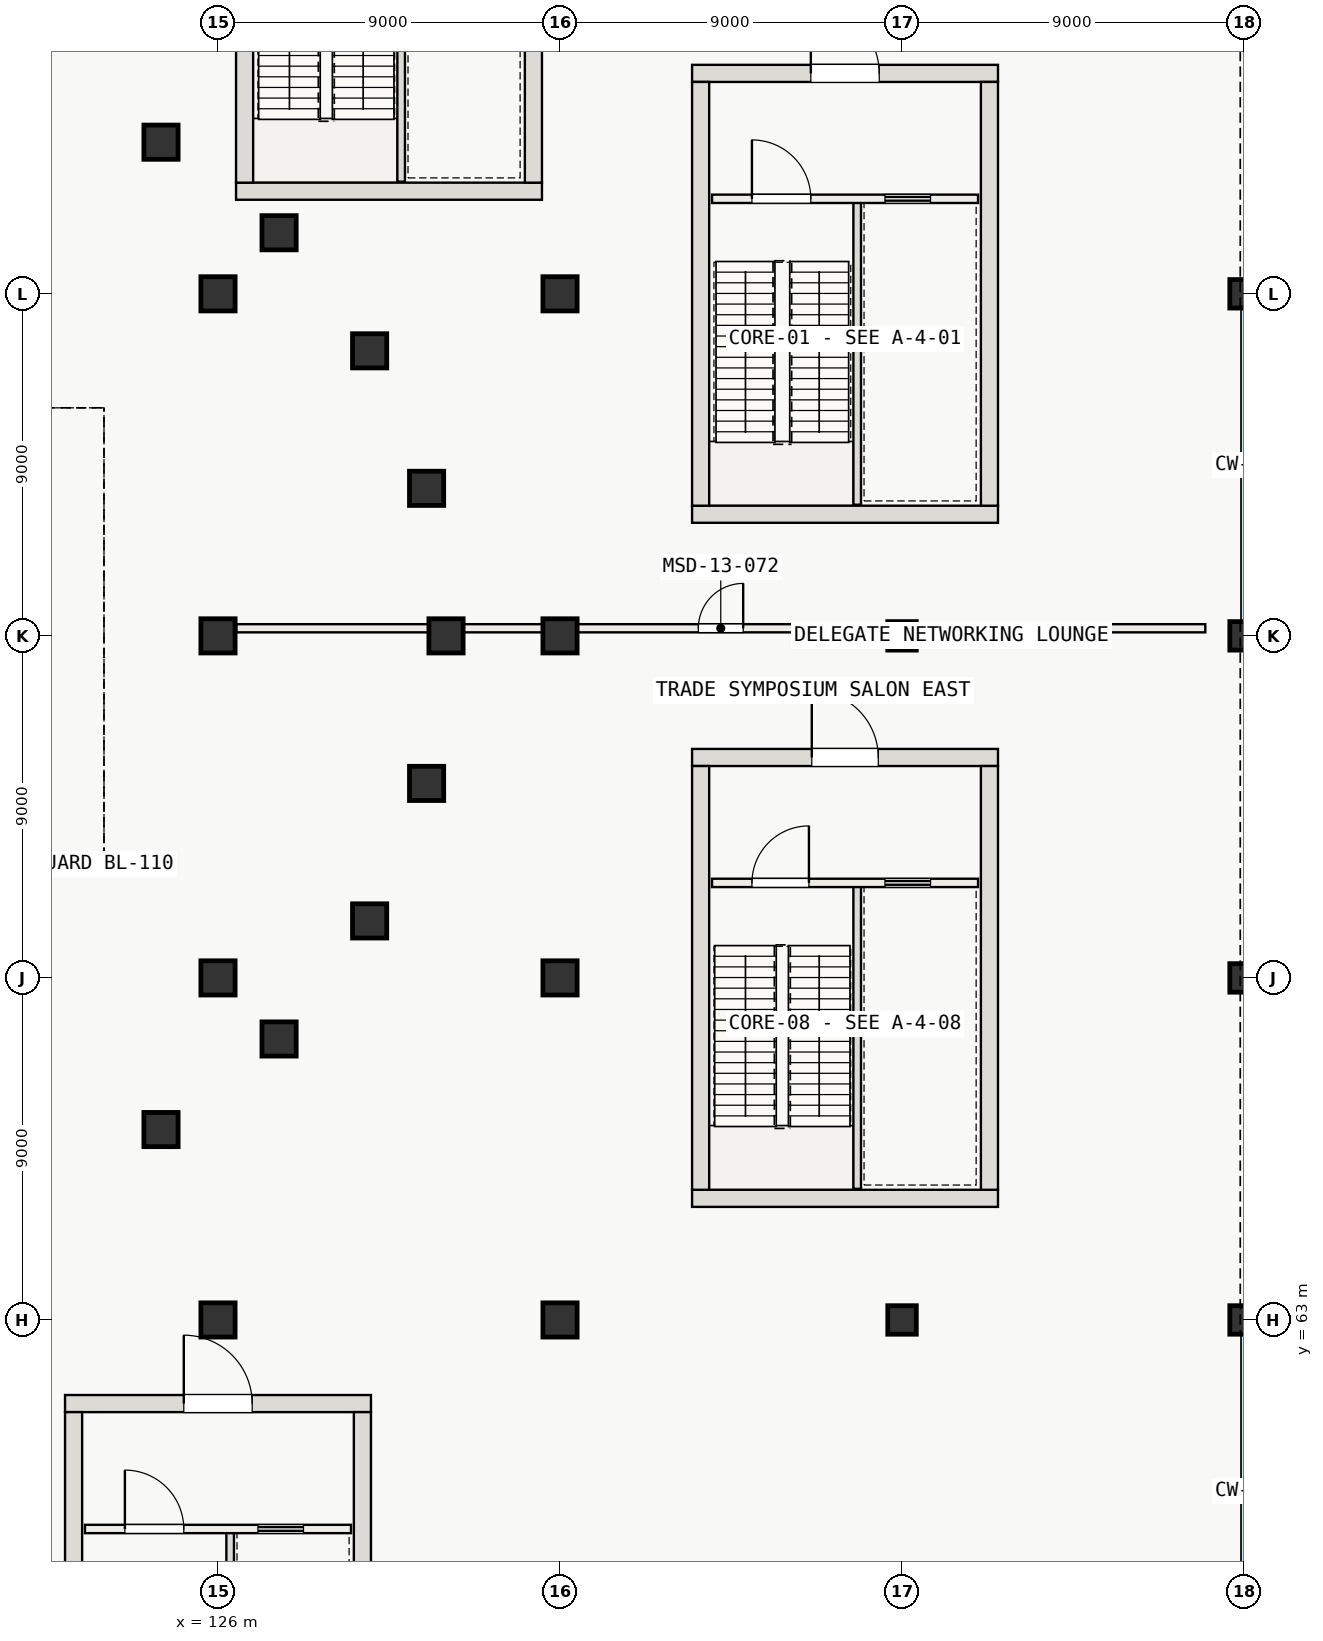
"""IFC4 building model, lengths in metres.
Left out: names, types, materials, properties, quantities, classifications, styles, units other than length and angle.
Written with IfcOpenShell. Run it as: python <this file> out.ifc"""

import sys

from ifc_helpers import new_model, si_unit, direction, frame, frame_2d, origin, origin_2d, place, context, subcontext, project, spatial, rectangle, circle, extrude, element, fill, save


model = new_model("IFC4")
c1 = context("Model", 3, precision=1e-05, world=origin(), true_north=direction((0.0, 1.0)))
c2 = subcontext(c1, "Body", "Model", "MODEL_VIEW")
j1 = project(units=[si_unit("LENGTHUNIT", "METRE"), si_unit("PLANEANGLEUNIT", "RADIAN")], contexts=[c1])
p1 = place(None, origin())
s1 = spatial("IfcSite", under=j1, at=p1, CompositionType="ELEMENT")
p2 = place(p1, origin())
s2 = spatial("IfcBuilding", under=s1, at=p2, CompositionType="ELEMENT")
p3 = place(p2, frame((0.0, 0.0, 6.0)))
s3 = spatial("IfcBuildingStorey", under=s2, at=p3, CompositionType="ELEMENT", Elevation=6.0)
p4 = place(p3, frame((138.475, 84.2, 0.0), z_axis=(0.0, 0.0, 1.0), x_axis=(1.0, 0.0, 0.0)))
e1 = element("IfcWall", 1, at=p4, inside=s3, PredefinedType="SHEAR", context=c2, shape_type="SweptSolid", body=[
    extrude(rectangle(XDim=8.05, YDim=0.45, at=frame_2d((4.025, 0.0))), origin(), (0.0, 0.0, 1.0), 6.0),
])
p5 = place(p3, frame((138.475, 95.8, 0.0), z_axis=(0.0, 0.0, 1.0), x_axis=(1.0, 0.0, 0.0)))
e2 = element("IfcWall", 2, at=p5, inside=s3, PredefinedType="SHEAR", context=c2, shape_type="SweptSolid", body=[
    extrude(rectangle(XDim=8.05, YDim=0.45, at=frame_2d((4.025, 0.0))), origin(), (0.0, 0.0, 1.0), 6.0),
])
p6 = place(p5, frame((3.125, 0.0, 0.0)))
e3 = element("IfcOpeningElement", 3, at=p6, cuts=e2, PredefinedType="OPENING", context=c2, shape_type="SweptSolid", body=[
    extrude(rectangle(XDim=1.8, YDim=2.3, at=frame_2d((0.9, 1.15))), frame((0.0, 0.235, 0.0), z_axis=(0.0, -1.0, 0.0), x_axis=(1.0, 0.0, 0.0)), (0.0, 0.0, 1.0), 0.47),
])
for number, where, z_axis, x_axis in (
    (4, (138.7, 84.425, 0.0), (0.0, 0.0, 1.0), (0.0, 1.0, 0.0)),
    (5, (146.3, 84.425, 0.0), (0.0, 0.0, 1.0), (0.0, 1.0, 0.0)),
):
    element("IfcWall", number, at=place(p3, frame(where, z_axis=z_axis, x_axis=x_axis)), inside=s3, PredefinedType="SHEAR", context=c2, shape_type="SweptSolid", body=[
        extrude(rectangle(XDim=11.15, YDim=0.45, at=frame_2d((5.575, 0.0))), origin(), (0.0, 0.0, 1.0), 6.0),
    ])
p7 = place(p3, frame((126.475, 92.7, 0.0), z_axis=(0.0, 0.0, 1.0), x_axis=(1.0, 0.0, 0.0)))
e6 = element("IfcWall", 6, at=p7, inside=s3, PredefinedType="SHEAR", context=c2, shape_type="SweptSolid", body=[
    extrude(rectangle(XDim=8.05, YDim=0.45, at=frame_2d((4.025, 0.0))), origin(), (0.0, 0.0, 1.0), 6.0),
])
for number, where, z_axis, x_axis in (
    (7, (126.7, 92.925, 0.0), (0.0, 0.0, 1.0), (0.0, 1.0, 0.0)),
    (8, (134.3, 92.925, 0.0), (0.0, 0.0, 1.0), (0.0, 1.0, 0.0)),
):
    element("IfcWall", number, at=place(p3, frame(where, z_axis=z_axis, x_axis=x_axis)), inside=s3, PredefinedType="SHEAR", context=c2, shape_type="SweptSolid", body=[
        extrude(rectangle(XDim=11.15, YDim=0.45, at=frame_2d((5.575, 0.0))), origin(), (0.0, 0.0, 1.0), 6.0),
    ])
p8 = place(p3, frame((121.975, 60.8, 0.0), z_axis=(0.0, 0.0, 1.0), x_axis=(1.0, 0.0, 0.0)))
e9 = element("IfcWall", 9, at=p8, inside=s3, PredefinedType="SHEAR", context=c2, shape_type="SweptSolid", body=[
    extrude(rectangle(XDim=8.05, YDim=0.45, at=frame_2d((4.025, 0.0))), origin(), (0.0, 0.0, 1.0), 6.0),
])
p9 = place(p8, frame((3.125, 0.0, 0.0)))
e10 = element("IfcOpeningElement", 10, at=p9, cuts=e9, PredefinedType="OPENING", context=c2, shape_type="SweptSolid", body=[
    extrude(rectangle(XDim=1.8, YDim=2.3, at=frame_2d((0.9, 1.15))), frame((0.0, 0.235, 0.0), z_axis=(0.0, -1.0, 0.0), x_axis=(1.0, 0.0, 0.0)), (0.0, 0.0, 1.0), 0.47),
])
for number, where, z_axis, x_axis in (
    (11, (122.2, 49.425, 0.0), (0.0, 0.0, 1.0), (0.0, 1.0, 0.0)),
    (12, (129.8, 49.425, 0.0), (0.0, 0.0, 1.0), (0.0, 1.0, 0.0)),
):
    element("IfcWall", number, at=place(p3, frame(where, z_axis=z_axis, x_axis=x_axis)), inside=s3, PredefinedType="SHEAR", context=c2, shape_type="SweptSolid", body=[
        extrude(rectangle(XDim=11.15, YDim=0.45, at=frame_2d((5.575, 0.0))), origin(), (0.0, 0.0, 1.0), 6.0),
    ])
p10 = place(p3, frame((138.475, 66.2, 0.0), z_axis=(0.0, 0.0, 1.0), x_axis=(1.0, 0.0, 0.0)))
e13 = element("IfcWall", 13, at=p10, inside=s3, PredefinedType="SHEAR", context=c2, shape_type="SweptSolid", body=[
    extrude(rectangle(XDim=8.05, YDim=0.45, at=frame_2d((4.025, 0.0))), origin(), (0.0, 0.0, 1.0), 6.0),
])
p11 = place(p3, frame((138.475, 77.8, 0.0), z_axis=(0.0, 0.0, 1.0), x_axis=(1.0, 0.0, 0.0)))
e14 = element("IfcWall", 14, at=p11, inside=s3, PredefinedType="SHEAR", context=c2, shape_type="SweptSolid", body=[
    extrude(rectangle(XDim=8.05, YDim=0.45, at=frame_2d((4.025, 0.0))), origin(), (0.0, 0.0, 1.0), 6.0),
])
p12 = place(p11, frame((3.15, 0.0, 0.0)))
e15 = element("IfcOpeningElement", 15, at=p12, cuts=e14, PredefinedType="OPENING", context=c2, shape_type="SweptSolid", body=[
    extrude(rectangle(XDim=1.75, YDim=2.3, at=frame_2d((0.875, 1.15))), frame((0.0, 0.235, 0.0), z_axis=(0.0, -1.0, 0.0), x_axis=(1.0, 0.0, 0.0)), (0.0, 0.0, 1.0), 0.47),
])
for number, where, z_axis, x_axis in (
    (16, (138.7, 66.425, 0.0), (0.0, 0.0, 1.0), (0.0, 1.0, 0.0)),
    (17, (146.3, 66.425, 0.0), (0.0, 0.0, 1.0), (0.0, 1.0, 0.0)),
):
    element("IfcWall", number, at=place(p3, frame(where, z_axis=z_axis, x_axis=x_axis)), inside=s3, PredefinedType="SHEAR", context=c2, shape_type="SweptSolid", body=[
        extrude(rectangle(XDim=11.15, YDim=0.45, at=frame_2d((5.575, 0.0))), origin(), (0.0, 0.0, 1.0), 6.0),
    ])
for number, where, z_axis, x_axis in (
    (18, (124.5, 68.01, 0.0), (0.0, 0.0, 1.0), (1.0, 0.0, 0.0)),
    (19, (124.5, 93.99, 0.0), (0.0, 0.0, 1.0), (1.0, 0.0, 0.0)),
):
    element("IfcColumn", number, at=place(p3, frame(where, z_axis=z_axis, x_axis=x_axis)), inside=s3, PredefinedType="COLUMN", context=c2, shape_type="SweptSolid", body=[
        extrude(circle(Radius=0.45, at=origin_2d()), origin(), (0.0, 0.0, 1.0), 6.0),
    ])
for number, where, z_axis, x_axis in (
    (20, (126.0, 63.0, 0.0), (0.0, 0.0, 1.0), (1.0, 0.0, 0.0)),
    (21, (126.0, 72.0, 0.0), (0.0, 0.0, 1.0), (1.0, 0.0, 0.0)),
    (22, (126.0, 81.0, 0.0), (0.0, 0.0, 1.0), (1.0, 0.0, 0.0)),
    (23, (126.0, 90.0, 0.0), (0.0, 0.0, 1.0), (1.0, 0.0, 0.0)),
):
    element("IfcColumn", number, at=place(p3, frame(where, z_axis=z_axis, x_axis=x_axis)), inside=s3, PredefinedType="COLUMN", context=c2, shape_type="SweptSolid", body=[
        extrude(rectangle(XDim=0.9, YDim=0.9, at=origin_2d()), origin(), (0.0, 0.0, 1.0), 6.0),
    ])
for number, where, z_axis, x_axis in (
    (24, (127.607, 70.393, 0.0), (0.0, 0.0, 1.0), (1.0, 0.0, 0.0)),
    (25, (127.607, 91.607, 0.0), (0.0, 0.0, 1.0), (1.0, 0.0, 0.0)),
    (26, (129.99, 73.5, 0.0), (0.0, 0.0, 1.0), (1.0, 0.0, 0.0)),
    (27, (129.99, 88.5, 0.0), (0.0, 0.0, 1.0), (1.0, 0.0, 0.0)),
    (28, (131.489, 77.118, 0.0), (0.0, 0.0, 1.0), (1.0, 0.0, 0.0)),
    (29, (131.489, 84.882, 0.0), (0.0, 0.0, 1.0), (1.0, 0.0, 0.0)),
    (30, (132.0, 81.0, 0.0), (0.0, 0.0, 1.0), (1.0, 0.0, 0.0)),
):
    element("IfcColumn", number, at=place(p3, frame(where, z_axis=z_axis, x_axis=x_axis)), inside=s3, PredefinedType="COLUMN", context=c2, shape_type="SweptSolid", body=[
        extrude(circle(Radius=0.45, at=origin_2d()), origin(), (0.0, 0.0, 1.0), 6.0),
    ])
for number, where, z_axis, x_axis in (
    (31, (135.0, 63.0, 0.0), (0.0, 0.0, 1.0), (1.0, 0.0, 0.0)),
    (32, (135.0, 72.0, 0.0), (0.0, 0.0, 1.0), (1.0, 0.0, 0.0)),
    (33, (135.0, 81.0, 0.0), (0.0, 0.0, 1.0), (1.0, 0.0, 0.0)),
    (34, (135.0, 90.0, 0.0), (0.0, 0.0, 1.0), (1.0, 0.0, 0.0)),
):
    element("IfcColumn", number, at=place(p3, frame(where, z_axis=z_axis, x_axis=x_axis)), inside=s3, PredefinedType="COLUMN", context=c2, shape_type="SweptSolid", body=[
        extrude(rectangle(XDim=0.9, YDim=0.9, at=origin_2d()), origin(), (0.0, 0.0, 1.0), 6.0),
    ])
for number, where, z_axis, x_axis in (
    (35, (144.0, 63.0, 0.0), (0.0, 0.0, 1.0), (1.0, 0.0, 0.0)),
    (36, (144.0, 81.0, 0.0), (0.0, 0.0, 1.0), (1.0, 0.0, 0.0)),
    (37, (153.0, 63.0, 0.0), (0.0, 0.0, 1.0), (1.0, 0.0, 0.0)),
    (38, (153.0, 72.0, 0.0), (0.0, 0.0, 1.0), (1.0, 0.0, 0.0)),
    (39, (153.0, 81.0, 0.0), (0.0, 0.0, 1.0), (1.0, 0.0, 0.0)),
    (40, (153.0, 90.0, 0.0), (0.0, 0.0, 1.0), (1.0, 0.0, 0.0)),
):
    element("IfcColumn", number, at=place(p3, frame(where, z_axis=z_axis, x_axis=x_axis)), inside=s3, PredefinedType="COLUMN", context=c2, shape_type="SweptSolid", body=[
        extrude(rectangle(XDim=0.75, YDim=0.75, at=origin_2d()), origin(), (0.0, 0.0, 1.0), 6.0),
    ])
p13 = place(p3, frame((142.82, 84.45, 0.0), z_axis=(0.0, 0.0, 1.0), x_axis=(0.0, 1.0, 0.0)))
e41 = element("IfcWall", 41, at=p13, inside=s3, PredefinedType="SOLIDWALL", context=c2, shape_type="SweptSolid", body=[
    extrude(rectangle(XDim=8.0, YDim=0.2, at=frame_2d((4.0, 0.0))), origin(), (0.0, 0.0, 1.0), 6.0),
])
p14 = place(p3, frame((139.0, 92.5, 0.0), z_axis=(0.0, 0.0, 1.0), x_axis=(1.0, 0.0, 0.0)))
e42 = element("IfcWall", 42, at=p14, inside=s3, PredefinedType="SOLIDWALL", context=c2, shape_type="SweptSolid", body=[
    extrude(rectangle(XDim=7.0, YDim=0.22, at=frame_2d((3.5, 0.0))), origin(), (0.0, 0.0, 1.0), 5.62),
])
p15 = place(p14, frame((1.05, 0.0, 0.0)))
e43 = element("IfcOpeningElement", 43, at=p15, cuts=e42, PredefinedType="OPENING", context=c2, shape_type="SweptSolid", body=[
    extrude(rectangle(XDim=1.55, YDim=2.2, at=frame_2d((0.775, 1.1))), frame((0.0, 0.12, 0.0), z_axis=(0.0, -1.0, 0.0), x_axis=(1.0, 0.0, 0.0)), (0.0, 0.0, 1.0), 0.24),
])
p16 = place(p14, frame((4.55, 0.0, 0.0)))
e44 = element("IfcOpeningElement", 44, at=p16, cuts=e42, PredefinedType="OPENING", context=c2, shape_type="SweptSolid", body=[
    extrude(rectangle(XDim=1.2, YDim=2.2, at=frame_2d((0.6, 1.1))), frame((0.0, 0.12, 0.0), z_axis=(0.0, -1.0, 0.0), x_axis=(1.0, 0.0, 0.0)), (0.0, 0.0, 1.0), 0.24),
])
for number, where, z_axis, x_axis in (
    (45, (130.82, 92.95, 0.0), (0.0, 0.0, 1.0), (0.0, 1.0, 0.0)),
    (46, (126.32, 49.45, 0.0), (0.0, 0.0, 1.0), (0.0, 1.0, 0.0)),
):
    element("IfcWall", number, at=place(p3, frame(where, z_axis=z_axis, x_axis=x_axis)), inside=s3, PredefinedType="SOLIDWALL", context=c2, shape_type="SweptSolid", body=[
        extrude(rectangle(XDim=8.0, YDim=0.2, at=frame_2d((4.0, 0.0))), origin(), (0.0, 0.0, 1.0), 6.0),
    ])
p17 = place(p3, frame((122.5, 57.5, 0.0), z_axis=(0.0, 0.0, 1.0), x_axis=(1.0, 0.0, 0.0)))
e47 = element("IfcWall", 47, at=p17, inside=s3, PredefinedType="SOLIDWALL", context=c2, shape_type="SweptSolid", body=[
    extrude(rectangle(XDim=7.0, YDim=0.22, at=frame_2d((3.5, 0.0))), origin(), (0.0, 0.0, 1.0), 5.62),
])
p18 = place(p17, frame((1.05, 0.0, 0.0)))
e48 = element("IfcOpeningElement", 48, at=p18, cuts=e47, PredefinedType="OPENING", context=c2, shape_type="SweptSolid", body=[
    extrude(rectangle(XDim=1.55, YDim=2.2, at=frame_2d((0.775, 1.1))), frame((0.0, 0.12, 0.0), z_axis=(0.0, -1.0, 0.0), x_axis=(1.0, 0.0, 0.0)), (0.0, 0.0, 1.0), 0.24),
])
p19 = place(p17, frame((4.55, 0.0, 0.0)))
e49 = element("IfcOpeningElement", 49, at=p19, cuts=e47, PredefinedType="OPENING", context=c2, shape_type="SweptSolid", body=[
    extrude(rectangle(XDim=1.2, YDim=2.2, at=frame_2d((0.6, 1.1))), frame((0.0, 0.12, 0.0), z_axis=(0.0, -1.0, 0.0), x_axis=(1.0, 0.0, 0.0)), (0.0, 0.0, 1.0), 0.24),
])
p20 = place(p3, frame((142.82, 66.45, 0.0), z_axis=(0.0, 0.0, 1.0), x_axis=(0.0, 1.0, 0.0)))
e50 = element("IfcWall", 50, at=p20, inside=s3, PredefinedType="SOLIDWALL", context=c2, shape_type="SweptSolid", body=[
    extrude(rectangle(XDim=8.0, YDim=0.2, at=frame_2d((4.0, 0.0))), origin(), (0.0, 0.0, 1.0), 6.0),
])
p21 = place(p3, frame((139.0, 74.5, 0.0), z_axis=(0.0, 0.0, 1.0), x_axis=(1.0, 0.0, 0.0)))
e51 = element("IfcWall", 51, at=p21, inside=s3, PredefinedType="SOLIDWALL", context=c2, shape_type="SweptSolid", body=[
    extrude(rectangle(XDim=7.0, YDim=0.22, at=frame_2d((3.5, 0.0))), origin(), (0.0, 0.0, 1.0), 5.62),
])
p22 = place(p21, frame((1.05, 0.0, 0.0)))
e52 = element("IfcOpeningElement", 52, at=p22, cuts=e51, PredefinedType="OPENING", context=c2, shape_type="SweptSolid", body=[
    extrude(rectangle(XDim=1.5, YDim=2.2, at=frame_2d((0.75, 1.1))), frame((0.0, 0.12, 0.0), z_axis=(0.0, -1.0, 0.0), x_axis=(1.0, 0.0, 0.0)), (0.0, 0.0, 1.0), 0.24),
])
p23 = place(p21, frame((4.55, 0.0, 0.0)))
e53 = element("IfcOpeningElement", 53, at=p23, cuts=e51, PredefinedType="OPENING", context=c2, shape_type="SweptSolid", body=[
    extrude(rectangle(XDim=1.2, YDim=2.2, at=frame_2d((0.6, 1.1))), frame((0.0, 0.12, 0.0), z_axis=(0.0, -1.0, 0.0), x_axis=(1.0, 0.0, 0.0)), (0.0, 0.0, 1.0), 0.24),
])
p24 = place(p3, frame((126.48, 81.2, 0.0), z_axis=(0.0, 0.0, 1.0), x_axis=(1.0, 0.0, 0.0)))
e54 = element("IfcWall", 54, at=p24, inside=s3, PredefinedType="PARTITIONING", context=c2, shape_type="SweptSolid", body=[
    extrude(rectangle(XDim=25.5, YDim=0.215, at=frame_2d((12.75, 0.0))), origin(), (0.0, 0.0, 1.0), 4.64),
])
p25 = place(p24, frame((12.16, 0.0, 0.0)))
e55 = element("IfcOpeningElement", 55, at=p25, cuts=e54, PredefinedType="OPENING", context=c2, shape_type="SweptSolid", body=[
    extrude(rectangle(XDim=1.18, YDim=2.18, at=frame_2d((0.59, 1.09))), frame((0.0, 0.117, 0.0), z_axis=(0.0, -1.0, 0.0), x_axis=(1.0, 0.0, 0.0)), (0.0, 0.0, 1.0), 0.235),
])
p26 = place(p15, origin())
e56 = element("IfcDoor", 56, at=p26, inside=s3, OperationType="SINGLE_SWING_LEFT", PredefinedType="DOOR", context=c2, shape_type="SweptSolid", body=[
    extrude(rectangle(XDim=1.55, YDim=2.2, at=frame_2d((0.775, 1.1))), frame((0.0, 0.025, 0.0), z_axis=(0.0, -1.0, 0.0), x_axis=(1.0, 0.0, 0.0)), (0.0, 0.0, 1.0), 0.05),
])
fill(e43, e56)
p27 = place(p16, origin())
e57 = element("IfcDoor", 57, at=p27, inside=s3, OperationType="SLIDING_TO_LEFT", PredefinedType="DOOR", context=c2, shape_type="SweptSolid", body=[
    extrude(rectangle(XDim=1.2, YDim=2.2, at=frame_2d((0.6, 1.1))), frame((0.0, 0.025, 0.0), z_axis=(0.0, -1.0, 0.0), x_axis=(1.0, 0.0, 0.0)), (0.0, 0.0, 1.0), 0.05),
])
fill(e44, e57)
p28 = place(p6, origin())
e58 = element("IfcDoor", 58, at=p28, inside=s3, OperationType="DOUBLE_DOOR_SINGLE_SWING", PredefinedType="DOOR", context=c2, shape_type="SweptSolid", body=[
    extrude(rectangle(XDim=1.8, YDim=2.3, at=frame_2d((0.9, 1.15))), frame((0.0, 0.025, 0.0), z_axis=(0.0, -1.0, 0.0), x_axis=(1.0, 0.0, 0.0)), (0.0, 0.0, 1.0), 0.05),
])
fill(e3, e58)
p29 = place(p18, origin())
e59 = element("IfcDoor", 59, at=p29, inside=s3, OperationType="SINGLE_SWING_LEFT", PredefinedType="DOOR", context=c2, shape_type="SweptSolid", body=[
    extrude(rectangle(XDim=1.55, YDim=2.2, at=frame_2d((0.775, 1.1))), frame((0.0, 0.025, 0.0), z_axis=(0.0, -1.0, 0.0), x_axis=(1.0, 0.0, 0.0)), (0.0, 0.0, 1.0), 0.05),
])
fill(e48, e59)
p30 = place(p19, origin())
e60 = element("IfcDoor", 60, at=p30, inside=s3, OperationType="SLIDING_TO_LEFT", PredefinedType="DOOR", context=c2, shape_type="SweptSolid", body=[
    extrude(rectangle(XDim=1.2, YDim=2.2, at=frame_2d((0.6, 1.1))), frame((0.0, 0.025, 0.0), z_axis=(0.0, -1.0, 0.0), x_axis=(1.0, 0.0, 0.0)), (0.0, 0.0, 1.0), 0.05),
])
fill(e49, e60)
p31 = place(p9, origin())
e61 = element("IfcDoor", 61, at=p31, inside=s3, OperationType="DOUBLE_DOOR_SINGLE_SWING", PredefinedType="DOOR", context=c2, shape_type="SweptSolid", body=[
    extrude(rectangle(XDim=1.8, YDim=2.3, at=frame_2d((0.9, 1.15))), frame((0.0, 0.025, 0.0), z_axis=(0.0, -1.0, 0.0), x_axis=(1.0, 0.0, 0.0)), (0.0, 0.0, 1.0), 0.05),
])
fill(e10, e61)
p32 = place(p22, origin())
e62 = element("IfcDoor", 62, at=p32, inside=s3, OperationType="SINGLE_SWING_RIGHT", PredefinedType="DOOR", context=c2, shape_type="SweptSolid", body=[
    extrude(rectangle(XDim=1.5, YDim=2.2, at=frame_2d((0.75, 1.1))), frame((0.0, 0.025, 0.0), z_axis=(0.0, -1.0, 0.0), x_axis=(1.0, 0.0, 0.0)), (0.0, 0.0, 1.0), 0.05),
])
fill(e52, e62)
p33 = place(p23, origin())
e63 = element("IfcDoor", 63, at=p33, inside=s3, OperationType="SLIDING_TO_RIGHT", PredefinedType="DOOR", context=c2, shape_type="SweptSolid", body=[
    extrude(rectangle(XDim=1.2, YDim=2.2, at=frame_2d((0.6, 1.1))), frame((0.0, 0.025, 0.0), z_axis=(0.0, -1.0, 0.0), x_axis=(1.0, 0.0, 0.0)), (0.0, 0.0, 1.0), 0.05),
])
fill(e53, e63)
p34 = place(p12, origin())
e64 = element("IfcDoor", 64, at=p34, inside=s3, OperationType="DOUBLE_DOOR_SINGLE_SWING", PredefinedType="DOOR", context=c2, shape_type="SweptSolid", body=[
    extrude(rectangle(XDim=1.75, YDim=2.3, at=frame_2d((0.875, 1.15))), frame((0.0, 0.025, 0.0), z_axis=(0.0, -1.0, 0.0), x_axis=(1.0, 0.0, 0.0)), (0.0, 0.0, 1.0), 0.05),
])
fill(e15, e64)
p35 = place(p25, origin())
e65 = element("IfcDoor", 65, at=p35, inside=s3, OperationType="SINGLE_SWING_RIGHT", PredefinedType="DOOR", context=c2, shape_type="SweptSolid", body=[
    extrude(rectangle(XDim=1.18, YDim=2.18, at=frame_2d((0.59, 1.09))), frame((0.0, 0.025, 0.0), z_axis=(0.0, -1.0, 0.0), x_axis=(1.0, 0.0, 0.0)), (0.0, 0.0, 1.0), 0.05),
])
fill(e55, e65)
save(model, sys.argv[1])
